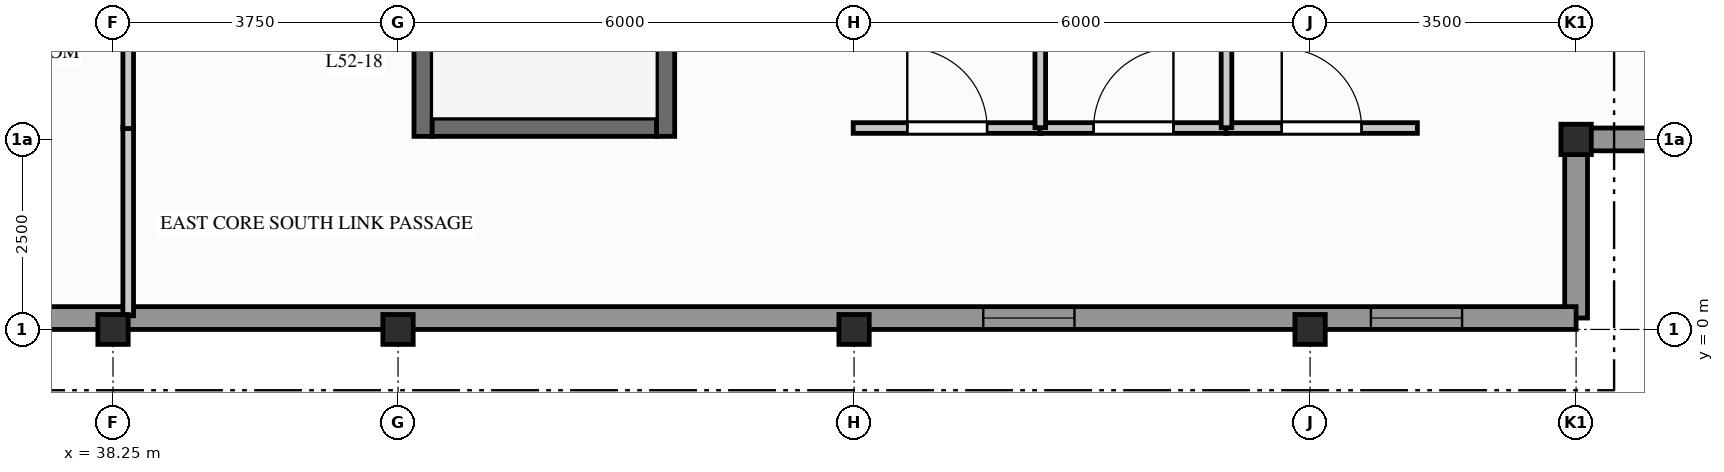
"""IFC4 building model, lengths in metres.
Left out: names, types, materials, properties, quantities, classifications, styles, units other than length and angle.
Written with IfcOpenShell. Run it as: python <this file> out.ifc"""

import sys

from ifc_helpers import new_model, si_unit, direction, frame, frame_2d, origin, origin_2d, place, context, subcontext, project, spatial, rectangle, hollow_rectangle, i_section, extrude, element, fill, save


model = new_model("IFC4")
c1 = context("Model", 3, precision=1e-05, world=origin(), true_north=direction((0.0, 1.0)))
c2 = subcontext(c1, "Body", "Model", "MODEL_VIEW")
j1 = project(units=[si_unit("LENGTHUNIT", "METRE"), si_unit("PLANEANGLEUNIT", "RADIAN")], contexts=[c1])
p1 = place(None, origin())
s1 = spatial("IfcSite", under=j1, at=p1, CompositionType="ELEMENT")
p2 = place(p1, origin())
s2 = spatial("IfcBuilding", under=s1, at=p2, CompositionType="ELEMENT")
p3 = place(p2, frame((0.0, 0.0, 172.8)))
s3 = spatial("IfcBuildingStorey", under=s2, at=p3, CompositionType="ELEMENT", Elevation=172.8)
for number, where, z_axis, x_axis in (
    (1, (38.25, 0.0, 0.0), (0.0, 0.0, 1.0), (1.0, 0.0, 0.0)),
    (2, (42.0, 0.0, 0.0), (0.0, 0.0, 1.0), (1.0, 0.0, 0.0)),
    (3, (48.0, 0.0, 0.0), (0.0, 0.0, 1.0), (1.0, 0.0, 0.0)),
    (4, (54.0, 0.0, 0.0), (0.0, 0.0, 1.0), (1.0, 0.0, 0.0)),
):
    element("IfcColumn", number, at=place(p3, frame(where, z_axis=z_axis, x_axis=x_axis)), inside=s3, PredefinedType="COLUMN", context=c2, shape_type="SweptSolid", body=[
        extrude(i_section(OverallWidth=0.399, OverallDepth=0.394, WebThickness=0.023, FlangeThickness=0.037, FilletRadius=0.015, at=origin_2d()), origin(), (0.0, 0.0, 1.0), 3.1),
    ])
p4 = place(p3, frame((57.5, 2.5, 0.0), z_axis=(0.0, 0.0, 1.0), x_axis=(1.0, 0.0, 0.0)))
e5 = element("IfcColumn", 5, at=p4, inside=s3, PredefinedType="COLUMN", context=c2, shape_type="SweptSolid", body=[
    extrude(hollow_rectangle(XDim=0.4, YDim=0.4, WallThickness=0.02, InnerFilletRadius=0.012, OuterFilletRadius=0.024, at=origin_2d()), origin(), (0.0, 0.0, 1.0), 3.1),
])
for number, where, z_axis, x_axis in (
    (6, (57.5, 0.15, 0.0), (0.0, 0.0, 1.0), (0.0, 1.0, 0.0)),
    (7, (57.5, 2.5, 0.0), (0.0, 0.0, 1.0), (1.0, 0.0, 0.0)),
):
    element("IfcWall", number, at=place(p3, frame(where, z_axis=z_axis, x_axis=x_axis)), inside=s3, PredefinedType="STANDARD", context=c2, shape_type="SweptSolid", body=[
        extrude(rectangle(XDim=2.35, YDim=0.3, at=frame_2d((1.175, 0.0))), origin(), (0.0, 0.0, 1.0), 2.89),
    ])
p5 = place(p3, frame((2.5, 0.15, 0.0), z_axis=(0.0, 0.0, 1.0), x_axis=(1.0, 0.0, 0.0)))
e8 = element("IfcWall", 8, at=p5, inside=s3, PredefinedType="STANDARD", context=c2, shape_type="SweptSolid", body=[
    extrude(rectangle(XDim=55.0, YDim=0.3, at=frame_2d((27.5, 0.0))), origin(), (0.0, 0.0, 1.0), 2.332),
])
p6 = place(p5, frame((1.0, 0.0, 0.312)))
e9 = element("IfcOpeningElement", 9, at=p6, cuts=e8, PredefinedType="OPENING", context=c2, shape_type="SweptSolid", body=[
    extrude(rectangle(XDim=1.5, YDim=1.8, at=frame_2d((0.75, 0.9))), frame((0.0, 0.16, 0.0), z_axis=(0.0, -1.0, 0.0), x_axis=(1.0, 0.0, 0.0)), (0.0, 0.0, 1.0), 0.32),
])
p7 = place(p5, frame((24.5, 0.0, 1.15)))
e10 = element("IfcOpeningElement", 10, at=p7, cuts=e8, PredefinedType="OPENING", context=c2, shape_type="SweptSolid", body=[
    extrude(rectangle(XDim=0.9, YDim=0.9, at=frame_2d((0.45, 0.45))), frame((0.0, 0.16, 0.0), z_axis=(0.0, -1.0, 0.0), x_axis=(1.0, 0.0, 0.0)), (0.0, 0.0, 1.0), 0.32),
])
p8 = place(p5, frame((47.2, 0.0, 0.512)))
e11 = element("IfcOpeningElement", 11, at=p8, cuts=e8, PredefinedType="OPENING", context=c2, shape_type="SweptSolid", body=[
    extrude(rectangle(XDim=1.2, YDim=1.6, at=frame_2d((0.6, 0.8))), frame((0.0, 0.16, 0.0), z_axis=(0.0, -1.0, 0.0), x_axis=(1.0, 0.0, 0.0)), (0.0, 0.0, 1.0), 0.32),
])
p9 = place(p5, frame((52.3, 0.0, 0.512)))
e12 = element("IfcOpeningElement", 12, at=p9, cuts=e8, PredefinedType="OPENING", context=c2, shape_type="SweptSolid", body=[
    extrude(rectangle(XDim=1.2, YDim=1.6, at=frame_2d((0.6, 0.8))), frame((0.0, 0.16, 0.0), z_axis=(0.0, -1.0, 0.0), x_axis=(1.0, 0.0, 0.0)), (0.0, 0.0, 1.0), 0.32),
])
p10 = place(p5, frame((4.988, 0.0, 0.512)))
e13 = element("IfcOpeningElement", 13, at=p10, cuts=e8, PredefinedType="OPENING", context=c2, shape_type="SweptSolid", body=[
    extrude(rectangle(XDim=1.2, YDim=1.6, at=frame_2d((0.6, 0.8))), frame((0.0, 0.16, 0.0), z_axis=(0.0, -1.0, 0.0), x_axis=(1.0, 0.0, 0.0)), (0.0, 0.0, 1.0), 0.32),
])
for number, where, z_axis, x_axis in (
    (14, (42.33, 2.54, 0.0), (0.0, 0.0, 1.0), (0.0, 1.0, 0.0)),
    (15, (45.52, 2.54, 0.0), (0.0, 0.0, 1.0), (0.0, 1.0, 0.0)),
):
    element("IfcWall", number, at=place(p3, frame(where, z_axis=z_axis, x_axis=x_axis)), inside=s3, PredefinedType="SHEAR", context=c2, shape_type="SweptSolid", body=[
        extrude(rectangle(XDim=7.2, YDim=0.24, at=frame_2d((3.6, 0.0))), origin(), (0.0, 0.0, 1.0), 2.89),
    ])
p11 = place(p3, frame((42.45, 2.66, 0.0), z_axis=(0.0, 0.0, 1.0), x_axis=(1.0, 0.0, 0.0)))
e16 = element("IfcWall", 16, at=p11, inside=s3, PredefinedType="SHEAR", context=c2, shape_type="SweptSolid", body=[
    extrude(rectangle(XDim=2.95, YDim=0.24, at=frame_2d((1.475, 0.0))), origin(), (0.0, 0.0, 1.0), 2.89),
])
p12 = place(p3, frame((38.45, 0.18, 0.0), z_axis=(0.0, 0.0, 1.0), x_axis=(0.0, 1.0, 0.0)))
e17 = element("IfcWall", 17, at=p12, inside=s3, PredefinedType="PARTITIONING", context=c2, shape_type="SweptSolid", body=[
    extrude(rectangle(XDim=2.481, YDim=0.14, at=frame_2d((1.241, 0.0))), origin(), (0.0, 0.0, 1.0), 2.253),
])
p13 = place(p3, frame((38.45, 2.643, 0.0), z_axis=(0.0, 0.0, 1.0), x_axis=(0.0, 1.0, 0.0)))
e18 = element("IfcWall", 18, at=p13, inside=s3, PredefinedType="PARTITIONING", context=c2, shape_type="SweptSolid", body=[
    extrude(rectangle(XDim=2.269, YDim=0.14, at=frame_2d((1.134, 0.0))), origin(), (0.0, 0.0, 1.0), 2.253),
])
p14 = place(p3, frame((47.989, 2.65, 0.0), z_axis=(0.0, 0.0, 1.0), x_axis=(1.0, 0.0, 0.0)))
e19 = element("IfcWall", 19, at=p14, inside=s3, PredefinedType="PARTITIONING", context=c2, shape_type="SweptSolid", body=[
    extrude(rectangle(XDim=2.472, YDim=0.14, at=frame_2d((1.236, 0.0))), origin(), (0.0, 0.0, 1.0), 2.253),
])
p15 = place(p14, frame((0.711, 0.0, 0.0)))
e20 = element("IfcOpeningElement", 20, at=p15, cuts=e19, PredefinedType="OPENING", context=c2, shape_type="SweptSolid", body=[
    extrude(rectangle(XDim=1.05, YDim=2.06, at=frame_2d((0.525, 1.03))), frame((0.0, 0.08, 0.0), z_axis=(0.0, -1.0, 0.0), x_axis=(1.0, 0.0, 0.0)), (0.0, 0.0, 1.0), 0.16),
])
p16 = place(p3, frame((50.443, 2.65, 0.0), z_axis=(0.0, 0.0, 1.0), x_axis=(1.0, 0.0, 0.0)))
e21 = element("IfcWall", 21, at=p16, inside=s3, PredefinedType="PARTITIONING", context=c2, shape_type="SweptSolid", body=[
    extrude(rectangle(XDim=2.469, YDim=0.14, at=frame_2d((1.234, 0.0))), origin(), (0.0, 0.0, 1.0), 2.89),
])
p17 = place(p16, frame((0.709, 0.0, 0.0)))
e22 = element("IfcOpeningElement", 22, at=p17, cuts=e21, PredefinedType="OPENING", context=c2, shape_type="SweptSolid", body=[
    extrude(rectangle(XDim=1.05, YDim=2.06, at=frame_2d((0.525, 1.03))), frame((0.0, 0.08, 0.0), z_axis=(0.0, -1.0, 0.0), x_axis=(1.0, 0.0, 0.0)), (0.0, 0.0, 1.0), 0.16),
])
p18 = place(p3, frame((52.893, 2.65, 0.0), z_axis=(0.0, 0.0, 1.0), x_axis=(1.0, 0.0, 0.0)))
e23 = element("IfcWall", 23, at=p18, inside=s3, PredefinedType="PARTITIONING", context=c2, shape_type="SweptSolid", body=[
    extrude(rectangle(XDim=2.519, YDim=0.14, at=frame_2d((1.259, 0.0))), origin(), (0.0, 0.0, 1.0), 2.253),
])
p19 = place(p18, frame((0.734, 0.0, 0.0)))
e24 = element("IfcOpeningElement", 24, at=p19, cuts=e23, PredefinedType="OPENING", context=c2, shape_type="SweptSolid", body=[
    extrude(rectangle(XDim=1.05, YDim=2.06, at=frame_2d((0.525, 1.03))), frame((0.0, 0.08, 0.0), z_axis=(0.0, -1.0, 0.0), x_axis=(1.0, 0.0, 0.0)), (0.0, 0.0, 1.0), 0.16),
])
for number, where, z_axis, x_axis in (
    (25, (50.45, 2.654, 0.0), (0.0, 0.0, 1.0), (0.0, 1.0, 0.0)),
    (26, (52.9, 2.654, 0.0), (0.0, 0.0, 1.0), (0.0, 1.0, 0.0)),
):
    element("IfcWall", number, at=place(p3, frame(where, z_axis=z_axis, x_axis=x_axis)), inside=s3, PredefinedType="PARTITIONING", context=c2, shape_type="SweptSolid", body=[
        extrude(rectangle(XDim=4.546, YDim=0.14, at=frame_2d((2.273, 0.0))), origin(), (0.0, 0.0, 1.0), 2.89),
    ])
p20 = place(p8, origin())
e27 = element("IfcWindow", 27, at=p20, inside=s3, PartitioningType="SINGLE_PANEL", PredefinedType="WINDOW", context=c2, shape_type="SweptSolid", body=[
    extrude(rectangle(XDim=1.2, YDim=1.6, at=frame_2d((0.6, 0.8))), frame((0.0, 0.03, 0.0), z_axis=(0.0, -1.0, 0.0), x_axis=(1.0, 0.0, 0.0)), (0.0, 0.0, 1.0), 0.06),
])
fill(e11, e27)
p21 = place(p9, origin())
e28 = element("IfcWindow", 28, at=p21, inside=s3, PartitioningType="SINGLE_PANEL", PredefinedType="WINDOW", context=c2, shape_type="SweptSolid", body=[
    extrude(rectangle(XDim=1.2, YDim=1.6, at=frame_2d((0.6, 0.8))), frame((0.0, 0.03, 0.0), z_axis=(0.0, -1.0, 0.0), x_axis=(1.0, 0.0, 0.0)), (0.0, 0.0, 1.0), 0.06),
])
fill(e12, e28)
p22 = place(p15, origin())
e29 = element("IfcDoor", 29, at=p22, inside=s3, OperationType="SINGLE_SWING_LEFT", PredefinedType="DOOR", context=c2, shape_type="SweptSolid", body=[
    extrude(rectangle(XDim=1.05, YDim=2.06, at=frame_2d((0.525, 1.03))), frame((0.0, 0.025, 0.0), z_axis=(0.0, -1.0, 0.0), x_axis=(1.0, 0.0, 0.0)), (0.0, 0.0, 1.0), 0.05),
])
fill(e20, e29)
p23 = place(p17, origin())
e30 = element("IfcDoor", 30, at=p23, inside=s3, OperationType="SINGLE_SWING_RIGHT", PredefinedType="DOOR", context=c2, shape_type="SweptSolid", body=[
    extrude(rectangle(XDim=1.05, YDim=2.06, at=frame_2d((0.525, 1.03))), frame((0.0, 0.025, 0.0), z_axis=(0.0, -1.0, 0.0), x_axis=(1.0, 0.0, 0.0)), (0.0, 0.0, 1.0), 0.05),
])
fill(e22, e30)
p24 = place(p19, origin())
e31 = element("IfcDoor", 31, at=p24, inside=s3, OperationType="SINGLE_SWING_LEFT", PredefinedType="DOOR", context=c2, shape_type="SweptSolid", body=[
    extrude(rectangle(XDim=1.05, YDim=2.06, at=frame_2d((0.525, 1.03))), frame((0.0, 0.025, 0.0), z_axis=(0.0, -1.0, 0.0), x_axis=(1.0, 0.0, 0.0)), (0.0, 0.0, 1.0), 0.05),
])
fill(e24, e31)
save(model, sys.argv[1])
